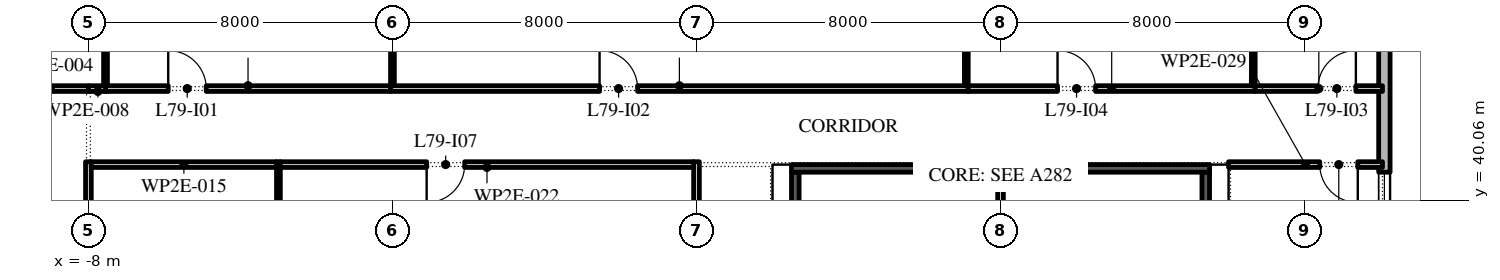
"""IFC4 building model, lengths in metres.
Left out: names, types, materials, properties, quantities, classifications, styles, units other than length and angle.
Written with IfcOpenShell. Run it as: python <this file> out.ifc"""

import sys

from ifc_helpers import new_model, si_unit, direction, frame, frame_2d, origin, place, context, subcontext, project, spatial, rectangle, extrude, element, fill, save


model = new_model("IFC4")
c1 = context("Model", 3, precision=1e-05, world=origin(), true_north=direction((0.0, 1.0)))
c2 = subcontext(c1, "Body", "Model", "MODEL_VIEW")
j1 = project(units=[si_unit("LENGTHUNIT", "METRE"), si_unit("PLANEANGLEUNIT", "RADIAN")], contexts=[c1])
p1 = place(None, origin())
s1 = spatial("IfcSite", under=j1, at=p1, CompositionType="ELEMENT")
p2 = place(p1, origin())
s2 = spatial("IfcBuilding", under=s1, at=p2, CompositionType="ELEMENT")
p3 = place(p2, frame((0.0, 0.0, 359.4)))
s3 = spatial("IfcBuildingStorey", under=s2, at=p3, CompositionType="ELEMENT", Elevation=359.4)
p4 = place(p3, frame((26.1, -2.1, 0.0), z_axis=(0.0, 0.0, 1.0), x_axis=(0.0, 1.0, 0.0)))
e1 = element("IfcWall", 1, at=p4, inside=s3, PredefinedType="STANDARD", context=c2, shape_type="SweptSolid", body=[
    extrude(rectangle(XDim=51.5, YDim=0.3, at=frame_2d((25.75, 0.0))), origin(), (0.0, 0.0, 1.0), 3.9),
])
p5 = place(p4, frame((1.05, 0.0, 0.45)))
e2 = element("IfcOpeningElement", 2, at=p5, cuts=e1, PredefinedType="OPENING", context=c2, shape_type="SweptSolid", body=[
    extrude(rectangle(XDim=5.0, YDim=2.95, at=frame_2d((2.5, 1.475))), frame((0.0, 0.16, 0.0), z_axis=(0.0, -1.0, 0.0), x_axis=(1.0, 0.0, 0.0)), (0.0, 0.0, 1.0), 0.32),
])
p6 = place(p4, frame((8.3, 0.0, 0.45)))
e3 = element("IfcOpeningElement", 3, at=p6, cuts=e1, PredefinedType="OPENING", context=c2, shape_type="SweptSolid", body=[
    extrude(rectangle(XDim=5.0, YDim=2.95, at=frame_2d((2.5, 1.475))), frame((0.0, 0.16, 0.0), z_axis=(0.0, -1.0, 0.0), x_axis=(1.0, 0.0, 0.0)), (0.0, 0.0, 1.0), 0.32),
])
p7 = place(p4, frame((17.0, 0.0, 0.0)))
e4 = element("IfcOpeningElement", 4, at=p7, cuts=e1, PredefinedType="OPENING", context=c2, shape_type="SweptSolid", body=[
    extrude(rectangle(XDim=2.4, YDim=3.5, at=frame_2d((1.2, 1.75))), frame((0.0, 0.16, 0.0), z_axis=(0.0, -1.0, 0.0), x_axis=(1.0, 0.0, 0.0)), (0.0, 0.0, 1.0), 0.32),
])
p8 = place(p4, frame((23.1, 0.0, 0.45)))
e5 = element("IfcOpeningElement", 5, at=p8, cuts=e1, PredefinedType="OPENING", context=c2, shape_type="SweptSolid", body=[
    extrude(rectangle(XDim=5.0, YDim=2.95, at=frame_2d((2.5, 1.475))), frame((0.0, 0.16, 0.0), z_axis=(0.0, -1.0, 0.0), x_axis=(1.0, 0.0, 0.0)), (0.0, 0.0, 1.0), 0.32),
])
p9 = place(p4, frame((30.5, 0.0, 0.45)))
e6 = element("IfcOpeningElement", 6, at=p9, cuts=e1, PredefinedType="OPENING", context=c2, shape_type="SweptSolid", body=[
    extrude(rectangle(XDim=5.0, YDim=2.95, at=frame_2d((2.5, 1.475))), frame((0.0, 0.16, 0.0), z_axis=(0.0, -1.0, 0.0), x_axis=(1.0, 0.0, 0.0)), (0.0, 0.0, 1.0), 0.32),
])
p10 = place(p4, frame((37.9, 0.0, 0.45)))
e7 = element("IfcOpeningElement", 7, at=p10, cuts=e1, PredefinedType="OPENING", context=c2, shape_type="SweptSolid", body=[
    extrude(rectangle(XDim=5.0, YDim=2.9, at=frame_2d((2.5, 1.45))), frame((0.0, 0.16, 0.0), z_axis=(0.0, -1.0, 0.0), x_axis=(1.0, 0.0, 0.0)), (0.0, 0.0, 1.0), 0.32),
])
p11 = place(p4, frame((46.6, 0.0, 0.0)))
e8 = element("IfcOpeningElement", 8, at=p11, cuts=e1, PredefinedType="OPENING", context=c2, shape_type="SweptSolid", body=[
    extrude(rectangle(XDim=2.4, YDim=3.5, at=frame_2d((1.2, 1.75))), frame((0.0, 0.16, 0.0), z_axis=(0.0, -1.0, 0.0), x_axis=(1.0, 0.0, 0.0)), (0.0, 0.0, 1.0), 0.32),
])
p12 = place(p3, frame((21.4, 25.75, 0.0), z_axis=(0.0, 0.0, 1.0), x_axis=(0.0, 1.0, 0.0)))
e9 = element("IfcWall", 9, at=p12, inside=s3, PredefinedType="SHEAR", context=c2, shape_type="SweptSolid", body=[
    extrude(rectangle(XDim=15.05, YDim=0.2, at=frame_2d((7.525, 0.0))), origin(), (0.0, 0.0, 1.0), 3.9),
])
p13 = place(p12, frame((7.075, 0.0, 0.0)))
e10 = element("IfcOpeningElement", 10, at=p13, cuts=e9, PredefinedType="OPENING", context=c2, shape_type="SweptSolid", body=[
    extrude(rectangle(XDim=0.9, YDim=2.1, at=frame_2d((0.45, 1.05))), frame((0.0, 0.11, 0.0), z_axis=(0.0, -1.0, 0.0), x_axis=(1.0, 0.0, 0.0)), (0.0, 0.0, 1.0), 0.22),
])
p14 = place(p3, frame((10.6, 25.75, 0.0), z_axis=(0.0, 0.0, 1.0), x_axis=(0.0, 1.0, 0.0)))
e11 = element("IfcWall", 11, at=p14, inside=s3, PredefinedType="SHEAR", context=c2, shape_type="SweptSolid", body=[
    extrude(rectangle(XDim=15.05, YDim=0.2, at=frame_2d((7.525, 0.0))), origin(), (0.0, 0.0, 1.0), 3.9),
])
p15 = place(p14, frame((7.075, 0.0, 0.0)))
e12 = element("IfcOpeningElement", 12, at=p15, cuts=e11, PredefinedType="OPENING", context=c2, shape_type="SweptSolid", body=[
    extrude(rectangle(XDim=0.9, YDim=2.1, at=frame_2d((0.45, 1.05))), frame((0.0, 0.11, 0.0), z_axis=(0.0, -1.0, 0.0), x_axis=(1.0, 0.0, 0.0)), (0.0, 0.0, 1.0), 0.22),
])
p16 = place(p3, frame((10.5, 40.9, 0.0), z_axis=(0.0, 0.0, 1.0), x_axis=(1.0, 0.0, 0.0)))
e13 = element("IfcWall", 13, at=p16, inside=s3, PredefinedType="SHEAR", context=c2, shape_type="SweptSolid", body=[
    extrude(rectangle(XDim=11.0, YDim=0.2, at=frame_2d((5.5, 0.0))), origin(), (0.0, 0.0, 1.0), 3.9),
])
p17 = place(p3, frame((16.0, 25.75, 0.0), z_axis=(0.0, 0.0, 1.0), x_axis=(0.0, 1.0, 0.0)))
e14 = element("IfcWall", 14, at=p17, inside=s3, PredefinedType="PARTITIONING", context=c2, shape_type="SweptSolid", body=[
    extrude(rectangle(XDim=15.05, YDim=0.15, at=frame_2d((7.525, 0.0))), origin(), (0.0, 0.0, 1.0), 3.9),
])
p18 = place(p3, frame((-10.0, 43.0, 0.0), z_axis=(0.0, 0.0, 1.0), x_axis=(1.0, 0.0, 0.0)))
e15 = element("IfcWall", 15, at=p18, inside=s3, PredefinedType="PARTITIONING", context=c2, shape_type="SweptSolid", body=[
    extrude(rectangle(XDim=2.0, YDim=0.15, at=frame_2d((1.0, 0.0))), origin(), (0.0, 0.0, 1.0), 3.9),
])
p19 = place(p3, frame((-8.0, 41.075, 0.0), z_axis=(0.0, 0.0, 1.0), x_axis=(0.0, -1.0, 0.0)))
e16 = element("IfcWall", 16, at=p19, inside=s3, PredefinedType="PARTITIONING", context=c2, shape_type="SweptSolid", body=[
    extrude(rectangle(XDim=13.925, YDim=0.15, at=frame_2d((6.962, 0.0))), origin(), (0.0, 0.0, 1.0), 3.9),
])
p20 = place(p19, frame((7.975, 0.0, 0.0)))
e17 = element("IfcOpeningElement", 17, at=p20, cuts=e16, PredefinedType="OPENING", context=c2, shape_type="SweptSolid", body=[
    extrude(rectangle(XDim=1.0, YDim=2.1, at=frame_2d((0.5, 1.05))), frame((0.0, 0.085, 0.0), z_axis=(0.0, -1.0, 0.0), x_axis=(1.0, 0.0, 0.0)), (0.0, 0.0, 1.0), 0.17),
])
p21 = place(p3, frame((-8.0, 43.0, 0.0), z_axis=(0.0, 0.0, 1.0), x_axis=(1.0, 0.0, 0.0)))
e18 = element("IfcWall", 18, at=p21, inside=s3, PredefinedType="PARTITIONING", context=c2, shape_type="SweptSolid", body=[
    extrude(rectangle(XDim=0.5, YDim=0.15, at=frame_2d((0.25, 0.0))), origin(), (0.0, 0.0, 1.0), 3.9),
])
p22 = place(p3, frame((-7.55, 43.075, 0.0), z_axis=(0.0, 0.0, 1.0), x_axis=(0.0, 1.0, 0.0)))
e19 = element("IfcWall", 19, at=p22, inside=s3, PredefinedType="PARTITIONING", context=c2, shape_type="SweptSolid", body=[
    extrude(rectangle(XDim=9.725, YDim=0.1, at=frame_2d((4.863, 0.0))), origin(), (0.0, 0.0, 1.0), 3.9),
])
p23 = place(p3, frame((-7.55, 43.0, 0.0), z_axis=(0.0, 0.0, 1.0), x_axis=(1.0, 0.0, 0.0)))
e20 = element("IfcWall", 20, at=p23, inside=s3, PredefinedType="PARTITIONING", context=c2, shape_type="SweptSolid", body=[
    extrude(rectangle(XDim=7.5, YDim=0.15, at=frame_2d((3.75, 0.0))), origin(), (0.0, 0.0, 1.0), 3.9),
])
p24 = place(p23, frame((1.65, 0.0, 0.0)))
e21 = element("IfcOpeningElement", 21, at=p24, cuts=e20, PredefinedType="OPENING", context=c2, shape_type="SweptSolid", body=[
    extrude(rectangle(XDim=1.0, YDim=2.1, at=frame_2d((0.5, 1.05))), frame((0.0, 0.085, 0.0), z_axis=(0.0, -1.0, 0.0), x_axis=(1.0, 0.0, 0.0)), (0.0, 0.0, 1.0), 0.17),
])
p25 = place(p3, frame((-3.0, 37.55, 0.0), z_axis=(0.0, 0.0, 1.0), x_axis=(0.0, 1.0, 0.0)))
e22 = element("IfcWall", 22, at=p25, inside=s3, PredefinedType="PARTITIONING", context=c2, shape_type="SweptSolid", body=[
    extrude(rectangle(XDim=3.525, YDim=0.1, at=frame_2d((1.762, 0.0))), origin(), (0.0, 0.0, 1.0), 3.9),
])
p26 = place(p3, frame((-3.05, 41.0, 0.0), z_axis=(0.0, 0.0, 1.0), x_axis=(-1.0, 0.0, 0.0)))
e23 = element("IfcWall", 23, at=p26, inside=s3, PredefinedType="PARTITIONING", context=c2, shape_type="SweptSolid", body=[
    extrude(rectangle(XDim=4.875, YDim=0.15, at=frame_2d((2.438, 0.0))), origin(), (0.0, 0.0, 1.0), 3.9),
])
p27 = place(p3, frame((-0.05, 43.0, 0.0), z_axis=(0.0, 0.0, 1.0), x_axis=(1.0, 0.0, 0.0)))
e24 = element("IfcWall", 24, at=p27, inside=s3, PredefinedType="PARTITIONING", context=c2, shape_type="SweptSolid", body=[
    extrude(rectangle(XDim=15.2, YDim=0.15, at=frame_2d((7.6, 0.0))), origin(), (0.0, 0.0, 1.0), 3.9),
])
p28 = place(p27, frame((5.5, 0.0, 0.0)))
e25 = element("IfcOpeningElement", 25, at=p28, cuts=e24, PredefinedType="OPENING", context=c2, shape_type="SweptSolid", body=[
    extrude(rectangle(XDim=1.0, YDim=2.1, at=frame_2d((0.5, 1.05))), frame((0.0, 0.085, 0.0), z_axis=(0.0, -1.0, 0.0), x_axis=(1.0, 0.0, 0.0)), (0.0, 0.0, 1.0), 0.17),
])
p29 = place(p3, frame((0.0, 52.8, 0.0), z_axis=(0.0, 0.0, 1.0), x_axis=(0.0, -1.0, 0.0)))
e26 = element("IfcWall", 26, at=p29, inside=s3, PredefinedType="PARTITIONING", context=c2, shape_type="SweptSolid", body=[
    extrude(rectangle(XDim=9.725, YDim=0.1, at=frame_2d((4.863, 0.0))), origin(), (0.0, 0.0, 1.0), 2.973),
])
p30 = place(p3, frame((8.0, 37.55, 0.0), z_axis=(0.0, 0.0, 1.0), x_axis=(0.0, 1.0, 0.0)))
e27 = element("IfcWall", 27, at=p30, inside=s3, PredefinedType="PARTITIONING", context=c2, shape_type="SweptSolid", body=[
    extrude(rectangle(XDim=3.525, YDim=0.15, at=frame_2d((1.762, 0.0))), origin(), (0.0, 0.0, 1.0), 3.9),
])
p31 = place(p3, frame((7.925, 41.0, 0.0), z_axis=(0.0, 0.0, 1.0), x_axis=(-1.0, 0.0, 0.0)))
e28 = element("IfcWall", 28, at=p31, inside=s3, PredefinedType="PARTITIONING", context=c2, shape_type="SweptSolid", body=[
    extrude(rectangle(XDim=10.875, YDim=0.15, at=frame_2d((5.438, 0.0))), origin(), (0.0, 0.0, 1.0), 3.9),
])
p32 = place(p31, frame((6.025, 0.0, 0.0)))
e29 = element("IfcOpeningElement", 29, at=p32, cuts=e28, PredefinedType="OPENING", context=c2, shape_type="SweptSolid", body=[
    extrude(rectangle(XDim=1.0, YDim=2.1, at=frame_2d((0.5, 1.05))), frame((0.0, 0.085, 0.0), z_axis=(0.0, -1.0, 0.0), x_axis=(1.0, 0.0, 0.0)), (0.0, 0.0, 1.0), 0.17),
])
p33 = place(p3, frame((15.15, 43.0, 0.0), z_axis=(0.0, 0.0, 1.0), x_axis=(1.0, 0.0, 0.0)))
e30 = element("IfcWall", 30, at=p33, inside=s3, PredefinedType="PARTITIONING", context=c2, shape_type="SweptSolid", body=[
    extrude(rectangle(XDim=7.55, YDim=0.15, at=frame_2d((3.775, 0.0))), origin(), (0.0, 0.0, 1.0), 3.9),
])
p34 = place(p33, frame((2.35, 0.0, 0.0)))
e31 = element("IfcOpeningElement", 31, at=p34, cuts=e30, PredefinedType="OPENING", context=c2, shape_type="SweptSolid", body=[
    extrude(rectangle(XDim=1.0, YDim=2.1, at=frame_2d((0.5, 1.05))), frame((0.0, 0.085, 0.0), z_axis=(0.0, -1.0, 0.0), x_axis=(1.0, 0.0, 0.0)), (0.0, 0.0, 1.0), 0.17),
])
p35 = place(p3, frame((15.1, 52.8, 0.0), z_axis=(0.0, 0.0, 1.0), x_axis=(0.0, -1.0, 0.0)))
e32 = element("IfcWall", 32, at=p35, inside=s3, PredefinedType="PARTITIONING", context=c2, shape_type="SweptSolid", body=[
    extrude(rectangle(XDim=9.725, YDim=0.1, at=frame_2d((4.863, 0.0))), origin(), (0.0, 0.0, 1.0), 3.9),
])
p36 = place(p3, frame((22.65, 43.075, 0.0), z_axis=(0.0, 0.0, 1.0), x_axis=(0.0, 1.0, 0.0)))
e33 = element("IfcWall", 33, at=p36, inside=s3, PredefinedType="PARTITIONING", context=c2, shape_type="SweptSolid", body=[
    extrude(rectangle(XDim=6.335, YDim=0.1, at=frame_2d((3.167, 0.0))), origin(), (0.0, 0.0, 1.0), 3.9),
])
p37 = place(p3, frame((22.7, 43.0, 0.0), z_axis=(0.0, 0.0, 1.0), x_axis=(1.0, 0.0, 0.0)))
e34 = element("IfcWall", 34, at=p37, inside=s3, PredefinedType="PARTITIONING", context=c2, shape_type="SweptSolid", body=[
    extrude(rectangle(XDim=3.35, YDim=0.15, at=frame_2d((1.675, 0.0))), origin(), (0.0, 0.0, 1.0), 3.9),
])
p38 = place(p37, frame((1.65, 0.0, 0.0)))
e35 = element("IfcOpeningElement", 35, at=p38, cuts=e34, PredefinedType="OPENING", context=c2, shape_type="SweptSolid", body=[
    extrude(rectangle(XDim=1.0, YDim=2.1, at=frame_2d((0.5, 1.05))), frame((0.0, 0.085, 0.0), z_axis=(0.0, -1.0, 0.0), x_axis=(1.0, 0.0, 0.0)), (0.0, 0.0, 1.0), 0.17),
])
p39 = place(p3, frame((26.05, 41.0, 0.0), z_axis=(0.0, 0.0, 1.0), x_axis=(-1.0, 0.0, 0.0)))
e36 = element("IfcWall", 36, at=p39, inside=s3, PredefinedType="PARTITIONING", context=c2, shape_type="SweptSolid", body=[
    extrude(rectangle(XDim=4.05, YDim=0.15, at=frame_2d((2.025, 0.0))), origin(), (0.0, 0.0, 1.0), 3.9),
])
p40 = place(p39, frame((0.65, 0.0, 0.0)))
e37 = element("IfcOpeningElement", 37, at=p40, cuts=e36, PredefinedType="OPENING", context=c2, shape_type="SweptSolid", body=[
    extrude(rectangle(XDim=1.0, YDim=2.1, at=frame_2d((0.5, 1.05))), frame((0.0, 0.085, 0.0), z_axis=(0.0, -1.0, 0.0), x_axis=(1.0, 0.0, 0.0)), (0.0, 0.0, 1.0), 0.17),
])
p41 = place(p10, origin())
e38 = element("IfcWindow", 38, at=p41, inside=s3, PartitioningType="DOUBLE_PANEL_VERTICAL", PredefinedType="WINDOW", context=c2, shape_type="SweptSolid", body=[
    extrude(rectangle(XDim=5.0, YDim=2.9, at=frame_2d((2.5, 1.45))), frame((0.0, 0.03, 0.0), z_axis=(0.0, -1.0, 0.0), x_axis=(1.0, 0.0, 0.0)), (0.0, 0.0, 1.0), 0.06),
])
fill(e7, e38)
p42 = place(p24, origin())
e39 = element("IfcDoor", 39, at=p42, inside=s3, OperationType="SINGLE_SWING_RIGHT", PredefinedType="DOOR", context=c2, shape_type="SweptSolid", body=[
    extrude(rectangle(XDim=1.0, YDim=2.1, at=frame_2d((0.5, 1.05))), frame((0.0, 0.025, 0.0), z_axis=(0.0, -1.0, 0.0), x_axis=(1.0, 0.0, 0.0)), (0.0, 0.0, 1.0), 0.05),
])
fill(e21, e39)
p43 = place(p28, origin())
e40 = element("IfcDoor", 40, at=p43, inside=s3, OperationType="SINGLE_SWING_RIGHT", PredefinedType="DOOR", context=c2, shape_type="SweptSolid", body=[
    extrude(rectangle(XDim=1.0, YDim=2.1, at=frame_2d((0.5, 1.05))), frame((0.0, 0.025, 0.0), z_axis=(0.0, -1.0, 0.0), x_axis=(1.0, 0.0, 0.0)), (0.0, 0.0, 1.0), 0.05),
])
fill(e25, e40)
p44 = place(p38, origin())
e41 = element("IfcDoor", 41, at=p44, inside=s3, OperationType="SINGLE_SWING_LEFT", PredefinedType="DOOR", context=c2, shape_type="SweptSolid", body=[
    extrude(rectangle(XDim=1.0, YDim=2.1, at=frame_2d((0.5, 1.05))), frame((0.0, 0.025, 0.0), z_axis=(0.0, -1.0, 0.0), x_axis=(1.0, 0.0, 0.0)), (0.0, 0.0, 1.0), 0.05),
])
fill(e35, e41)
p45 = place(p34, origin())
e42 = element("IfcDoor", 42, at=p45, inside=s3, OperationType="SINGLE_SWING_RIGHT", PredefinedType="DOOR", context=c2, shape_type="SweptSolid", body=[
    extrude(rectangle(XDim=1.0, YDim=2.1, at=frame_2d((0.5, 1.05))), frame((0.0, 0.025, 0.0), z_axis=(0.0, -1.0, 0.0), x_axis=(1.0, 0.0, 0.0)), (0.0, 0.0, 1.0), 0.05),
])
fill(e31, e42)
p46 = place(p32, origin())
e43 = element("IfcDoor", 43, at=p46, inside=s3, OperationType="SINGLE_SWING_LEFT", PredefinedType="DOOR", context=c2, shape_type="SweptSolid", body=[
    extrude(rectangle(XDim=1.0, YDim=2.1, at=frame_2d((0.5, 1.05))), frame((0.0, 0.025, 0.0), z_axis=(0.0, -1.0, 0.0), x_axis=(1.0, 0.0, 0.0)), (0.0, 0.0, 1.0), 0.05),
])
fill(e29, e43)
p47 = place(p40, origin())
e44 = element("IfcDoor", 44, at=p47, inside=s3, OperationType="SINGLE_SWING_RIGHT", PredefinedType="DOOR", context=c2, shape_type="SweptSolid", body=[
    extrude(rectangle(XDim=1.0, YDim=2.1, at=frame_2d((0.5, 1.05))), frame((0.0, 0.025, 0.0), z_axis=(0.0, -1.0, 0.0), x_axis=(1.0, 0.0, 0.0)), (0.0, 0.0, 1.0), 0.05),
])
fill(e37, e44)
save(model, sys.argv[1])
